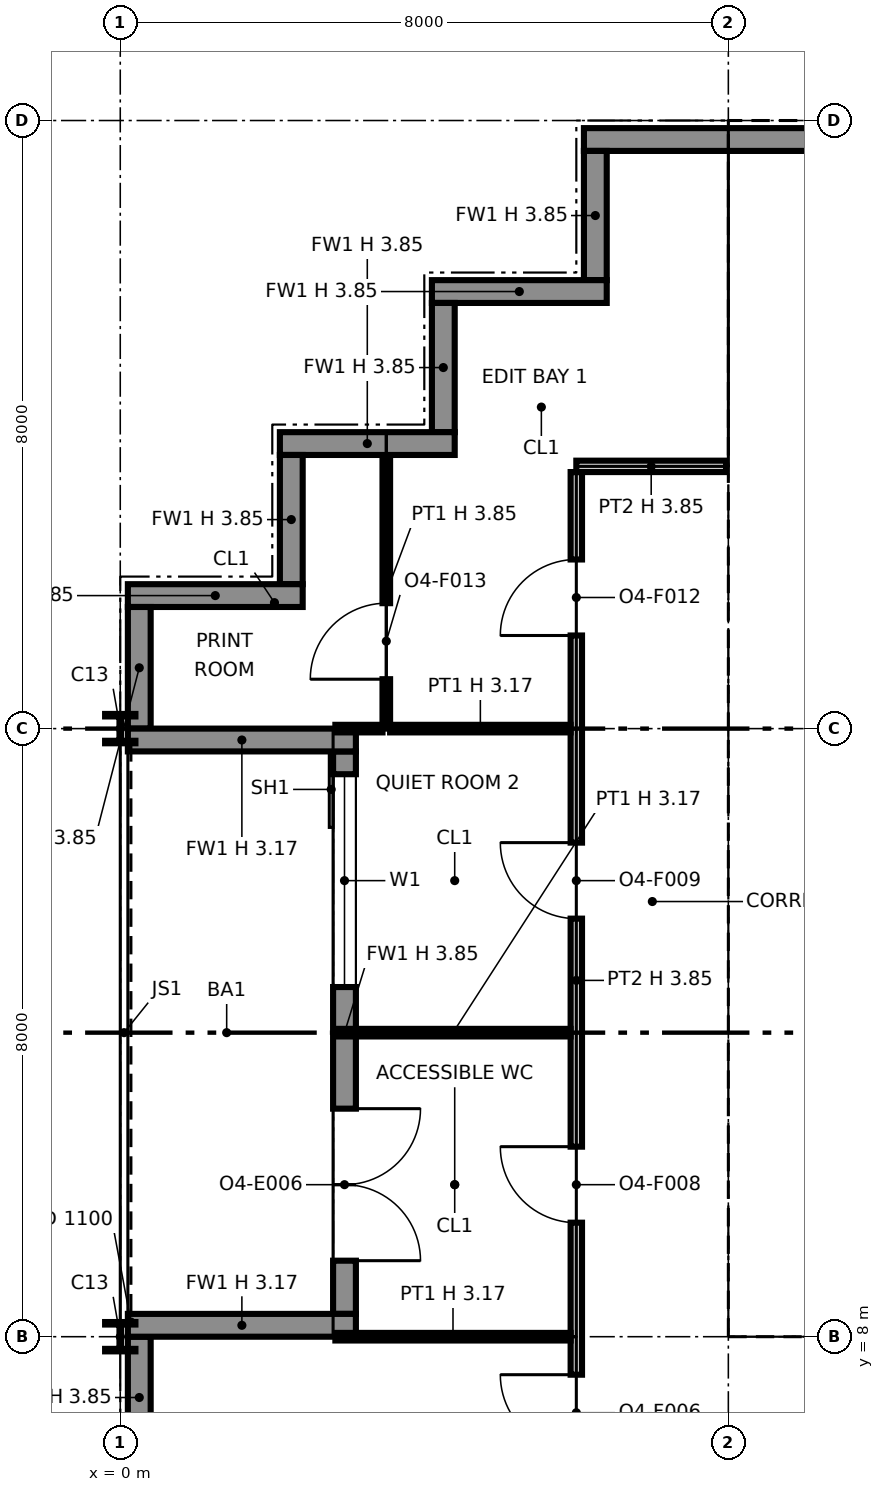
"""IFC4 building model, lengths in metres.
Left out: names, types, materials, properties, quantities, classifications, styles, units other than length and angle.
Written with IfcOpenShell. Run it as: python <this file> out.ifc"""

import sys

from ifc_helpers import new_model, si_unit, direction, frame, frame_2d, origin, origin_2d, place, context, subcontext, project, spatial, polyline, rectangle, i_section, outline, extrude, element, fill, save


model = new_model("IFC4")
c1 = context("Model", 3, precision=1e-05, world=origin(), true_north=direction((0.0, 1.0)))
c2 = subcontext(c1, "Body", "Model", "MODEL_VIEW")
j1 = project(units=[si_unit("LENGTHUNIT", "METRE"), si_unit("PLANEANGLEUNIT", "RADIAN")], contexts=[c1])
p1 = place(None, origin())
s1 = spatial("IfcSite", under=j1, at=p1, CompositionType="ELEMENT")
p2 = place(p1, origin())
s2 = spatial("IfcBuilding", under=s1, at=p2, CompositionType="ELEMENT")
p3 = place(p2, frame((0.0, 0.0, 221.0)))
s3 = spatial("IfcBuildingStorey", under=s2, at=p3, CompositionType="ELEMENT", Elevation=221.0)
for number, where, z_axis, x_axis in (
    (1, (0.0, 8.0, 0.0), (0.0, 0.0, 1.0), (1.0, 0.0, 0.0)),
    (2, (0.0, 16.0, 0.0), (0.0, 0.0, 1.0), (1.0, 0.0, 0.0)),
):
    element("IfcColumn", number, at=place(p3, frame(where, z_axis=z_axis, x_axis=x_axis)), inside=s3, PredefinedType="COLUMN", context=c2, shape_type="SweptSolid", body=[
        extrude(i_section(OverallWidth=0.399, OverallDepth=0.386, WebThickness=0.021, FlangeThickness=0.033, at=origin_2d()), origin(), (0.0, 0.0, 1.0), 3.85),
    ])
for number, where, z_axis, x_axis in (
    (3, (8.0, 8.0, 0.0), (0.0, 0.0, 1.0), (1.0, 0.0, 0.0)),
    (4, (8.0, 16.0, 0.0), (0.0, 0.0, 1.0), (1.0, 0.0, 0.0)),
):
    element("IfcColumn", number, at=place(p3, frame(where, z_axis=z_axis, x_axis=x_axis)), inside=s3, PredefinedType="COLUMN", context=c2, shape_type="SweptSolid", body=[
        extrude(i_section(OverallWidth=0.373, OverallDepth=0.368, WebThickness=0.015, FlangeThickness=0.024, at=origin_2d()), origin(), (0.0, 0.0, 1.0), 3.85),
    ])
p4 = place(p3, frame((8.0, 24.0, 0.0), z_axis=(0.0, 0.0, 1.0), x_axis=(1.0, 0.0, 0.0)))
e5 = element("IfcColumn", 5, at=p4, inside=s3, PredefinedType="COLUMN", context=c2, shape_type="SweptSolid", body=[
    extrude(i_section(OverallWidth=0.406, OverallDepth=0.417, WebThickness=0.03, FlangeThickness=0.048, at=origin_2d()), origin(), (0.0, 0.0, 1.0), 3.85),
])
p5 = place(p3, frame((32.0, 23.75, 0.0), z_axis=(0.0, 0.0, 1.0), x_axis=(-1.0, 0.0, 0.0)))
e6 = element("IfcWall", 6, at=p5, inside=s3, PredefinedType="SOLIDWALL", context=c2, shape_type="SweptSolid", body=[
    extrude(rectangle(XDim=25.9, YDim=0.3, at=frame_2d((12.95, 0.0))), origin(), (0.0, 0.0, 1.0), 3.85),
])
p6 = place(p3, frame((6.25, 23.6, 0.0), z_axis=(0.0, 0.0, 1.0), x_axis=(0.0, -1.0, 0.0)))
e7 = element("IfcWall", 7, at=p6, inside=s3, PredefinedType="SOLIDWALL", context=c2, shape_type="SweptSolid", body=[
    extrude(rectangle(XDim=1.7, YDim=0.3, at=frame_2d((0.85, 0.0))), origin(), (0.0, 0.0, 1.0), 3.85),
])
p7 = place(p3, frame((6.4, 21.75, 0.0), z_axis=(0.0, 0.0, 1.0), x_axis=(-1.0, 0.0, 0.0)))
e8 = element("IfcWall", 8, at=p7, inside=s3, PredefinedType="SOLIDWALL", context=c2, shape_type="SweptSolid", body=[
    extrude(rectangle(XDim=2.3, YDim=0.3, at=frame_2d((1.15, 0.0))), origin(), (0.0, 0.0, 1.0), 3.85),
])
p8 = place(p3, frame((4.25, 21.6, 0.0), z_axis=(0.0, 0.0, 1.0), x_axis=(0.0, -1.0, 0.0)))
e9 = element("IfcWall", 9, at=p8, inside=s3, PredefinedType="SOLIDWALL", context=c2, shape_type="SweptSolid", body=[
    extrude(rectangle(XDim=1.7, YDim=0.3, at=frame_2d((0.85, 0.0))), origin(), (0.0, 0.0, 1.0), 3.85),
])
p9 = place(p3, frame((4.4, 19.75, 0.0), z_axis=(0.0, 0.0, 1.0), x_axis=(-1.0, 0.0, 0.0)))
e10 = element("IfcWall", 10, at=p9, inside=s3, PredefinedType="SOLIDWALL", context=c2, shape_type="SweptSolid", body=[
    extrude(rectangle(XDim=2.3, YDim=0.3, at=frame_2d((1.15, 0.0))), origin(), (0.0, 0.0, 1.0), 3.85),
])
p10 = place(p3, frame((2.25, 19.6, 0.0), z_axis=(0.0, 0.0, 1.0), x_axis=(0.0, -1.0, 0.0)))
e11 = element("IfcWall", 11, at=p10, inside=s3, PredefinedType="SOLIDWALL", context=c2, shape_type="SweptSolid", body=[
    extrude(rectangle(XDim=1.7, YDim=0.3, at=frame_2d((0.85, 0.0))), origin(), (0.0, 0.0, 1.0), 3.85),
])
p11 = place(p3, frame((2.4, 17.75, 0.0), z_axis=(0.0, 0.0, 1.0), x_axis=(-1.0, 0.0, 0.0)))
e12 = element("IfcWall", 12, at=p11, inside=s3, PredefinedType="SOLIDWALL", context=c2, shape_type="SweptSolid", body=[
    extrude(rectangle(XDim=2.3, YDim=0.3, at=frame_2d((1.15, 0.0))), origin(), (0.0, 0.0, 1.0), 3.85),
])
p12 = place(p3, frame((0.25, 17.6, 0.0), z_axis=(0.0, 0.0, 1.0), x_axis=(0.0, -1.0, 0.0)))
e13 = element("IfcWall", 13, at=p12, inside=s3, PredefinedType="SOLIDWALL", context=c2, shape_type="SweptSolid", body=[
    extrude(rectangle(XDim=1.6, YDim=0.3, at=frame_2d((0.8, 0.0))), origin(), (0.0, 0.0, 1.0), 3.85),
])
p13 = place(p3, frame((2.95, 15.7, 0.0), z_axis=(0.0, 0.0, 1.0), x_axis=(0.0, -1.0, 0.0)))
e14 = element("IfcWall", 14, at=p13, inside=s3, PredefinedType="SOLIDWALL", context=c2, shape_type="SweptSolid", body=[
    extrude(rectangle(XDim=7.4, YDim=0.3, at=frame_2d((3.7, 0.0))), origin(), (0.0, 0.0, 1.0), 3.85),
])
p14 = place(p13, frame((0.3, 0.0, 0.9)))
e15 = element("IfcOpeningElement", 15, at=p14, cuts=e14, PredefinedType="OPENING", context=c2, shape_type="SweptSolid", body=[
    extrude(rectangle(XDim=2.8, YDim=2.2, at=frame_2d((1.4, 1.1))), frame((0.0, 0.16, 0.0), z_axis=(0.0, -1.0, 0.0), x_axis=(1.0, 0.0, 0.0)), (0.0, 0.0, 1.0), 0.32),
])
p15 = place(p13, frame((4.7, 0.0, 0.0)))
e16 = element("IfcOpeningElement", 16, at=p15, cuts=e14, PredefinedType="OPENING", context=c2, shape_type="SweptSolid", body=[
    extrude(rectangle(XDim=2.0, YDim=2.4, at=frame_2d((1.0, 1.2))), frame((0.0, 0.16, 0.0), z_axis=(0.0, -1.0, 0.0), x_axis=(1.0, 0.0, 0.0)), (0.0, 0.0, 1.0), 0.32),
])
for number, where, z_axis, x_axis in (
    (17, (0.1, 15.85, 0.0), (0.0, 0.0, 1.0), (1.0, 0.0, 0.0)),
    (18, (0.1, 8.15, 0.0), (0.0, 0.0, 1.0), (1.0, 0.0, 0.0)),
):
    element("IfcWall", number, at=place(p3, frame(where, z_axis=z_axis, x_axis=x_axis)), inside=s3, PredefinedType="SOLIDWALL", context=c2, shape_type="SweptSolid", body=[
        extrude(rectangle(XDim=3.0, YDim=0.3, at=frame_2d((1.5, 0.0))), origin(), (0.0, 0.0, 1.0), 3.171),
    ])
p16 = place(p3, frame((0.25, 8.0, 0.0), z_axis=(0.0, 0.0, 1.0), x_axis=(0.0, -1.0, 0.0)))
e19 = element("IfcWall", 19, at=p16, inside=s3, PredefinedType="SOLIDWALL", context=c2, shape_type="SweptSolid", body=[
    extrude(rectangle(XDim=1.6, YDim=0.3, at=frame_2d((0.8, 0.0))), origin(), (0.0, 0.0, 1.0), 3.85),
])
p17 = place(p3, frame((8.65, 8.75, 0.0), z_axis=(0.0, 0.0, 1.0), x_axis=(1.0, 0.0, 0.0)))
e20 = element("IfcWall", 20, at=p17, inside=s3, PredefinedType="PARTITIONING", context=c2, shape_type="SweptSolid", body=[
    extrude(outline(polyline([(0.0, 0.0), (14.7, 0.0), (14.7, 3.85), (7.438, 3.85), (7.438, 3.308), (7.262, 3.308), (7.261, 3.85), (0.0, 3.85), (0.0, 0.0)])), frame((0.0, 0.1, 0.0), z_axis=(0.0, -1.0, 0.0), x_axis=(1.0, 0.0, 0.0)), (0.0, 0.0, 1.0), 0.2),
])
p18 = place(p17, frame((1.3, 0.0, 0.0)))
e21 = element("IfcOpeningElement", 21, at=p18, cuts=e20, PredefinedType="OPENING", context=c2, shape_type="SweptSolid", body=[
    extrude(rectangle(XDim=1.4, YDim=2.1, at=frame_2d((0.7, 1.05))), frame((0.0, 0.11, 0.0), z_axis=(0.0, -1.0, 0.0), x_axis=(1.0, 0.0, 0.0)), (0.0, 0.0, 1.0), 0.22),
])
p19 = place(p17, frame((4.6, 0.0, 0.0)))
e22 = element("IfcOpeningElement", 22, at=p19, cuts=e20, PredefinedType="OPENING", context=c2, shape_type="SweptSolid", body=[
    extrude(rectangle(XDim=1.4, YDim=2.1, at=frame_2d((0.7, 1.05))), frame((0.0, 0.11, 0.0), z_axis=(0.0, -1.0, 0.0), x_axis=(1.0, 0.0, 0.0)), (0.0, 0.0, 1.0), 0.22),
])
p20 = place(p17, frame((10.4, 0.0, 0.0)))
e23 = element("IfcOpeningElement", 23, at=p20, cuts=e20, PredefinedType="OPENING", context=c2, shape_type="SweptSolid", body=[
    extrude(rectangle(XDim=1.2, YDim=2.1, at=frame_2d((0.6, 1.05))), frame((0.0, 0.11, 0.0), z_axis=(0.0, -1.0, 0.0), x_axis=(1.0, 0.0, 0.0)), (0.0, 0.0, 1.0), 0.22),
])
p21 = place(p3, frame((8.75, 8.85, 0.0), z_axis=(0.0, 0.0, 1.0), x_axis=(0.0, 1.0, 0.0)))
e24 = element("IfcWall", 24, at=p21, inside=s3, PredefinedType="PARTITIONING", context=c2, shape_type="SweptSolid", body=[
    extrude(outline(polyline([(0.0, 0.0), (14.3, 0.0), (14.3, 3.85), (10.225, 3.85), (10.224, 3.44), (10.076, 3.44), (10.075, 3.85), (7.239, 3.85), (7.238, 3.308), (7.062, 3.308), (7.062, 3.85), (0.0, 3.85), (0.0, 0.0)])), frame((0.0, 0.1, 0.0), z_axis=(0.0, -1.0, 0.0), x_axis=(1.0, 0.0, 0.0)), (0.0, 0.0, 1.0), 0.2),
])
p22 = place(p21, frame((8.3, 0.0, 0.0)))
e25 = element("IfcOpeningElement", 25, at=p22, cuts=e24, PredefinedType="OPENING", context=c2, shape_type="SweptSolid", body=[
    extrude(rectangle(XDim=1.8, YDim=2.1, at=frame_2d((0.9, 1.05))), frame((0.0, 0.11, 0.0), z_axis=(0.0, -1.0, 0.0), x_axis=(1.0, 0.0, 0.0)), (0.0, 0.0, 1.0), 0.22),
])
p23 = place(p3, frame((8.65, 23.25, 0.0), z_axis=(0.0, 0.0, 1.0), x_axis=(1.0, 0.0, 0.0)))
e26 = element("IfcWall", 26, at=p23, inside=s3, PredefinedType="PARTITIONING", context=c2, shape_type="SweptSolid", body=[
    extrude(outline(polyline([(0.0, 0.0), (14.7, 0.0), (14.7, 3.85), (7.438, 3.85), (7.438, 3.308), (7.262, 3.308), (7.261, 3.85), (0.0, 3.85), (0.0, 0.0)])), frame((0.0, 0.1, 0.0), z_axis=(0.0, -1.0, 0.0), x_axis=(1.0, 0.0, 0.0)), (0.0, 0.0, 1.0), 0.2),
])
p24 = place(p3, frame((8.85, 16.0, 0.0), z_axis=(0.0, 0.0, 1.0), x_axis=(1.0, 0.0, 0.0)))
e27 = element("IfcWall", 27, at=p24, inside=s3, PredefinedType="PARTITIONING", context=c2, shape_type="SweptSolid", body=[
    extrude(rectangle(XDim=6.953, YDim=0.6, at=frame_2d((3.477, 0.0))), origin(), (0.0, 0.0, 1.0), 3.308),
])
p25 = place(p3, frame((8.85, 19.9, 0.0), z_axis=(0.0, 0.0, 1.0), x_axis=(1.0, 0.0, 0.0)))
e28 = element("IfcWall", 28, at=p25, inside=s3, PredefinedType="PARTITIONING", context=c2, shape_type="SweptSolid", body=[
    extrude(outline(polyline([(0.0, 0.0), (14.3, 0.0), (14.3, 3.85), (7.239, 3.85), (7.238, 3.308), (7.062, 3.308), (7.062, 3.85), (0.0, 3.85), (0.0, 0.0)])), frame((0.0, 0.1, 0.0), z_axis=(0.0, -1.0, 0.0), x_axis=(1.0, 0.0, 0.0)), (0.0, 0.0, 1.0), 0.2),
])
p26 = place(p25, frame((2.125, 0.0, 0.0)))
e29 = element("IfcOpeningElement", 29, at=p26, cuts=e28, PredefinedType="OPENING", context=c2, shape_type="SweptSolid", body=[
    extrude(rectangle(XDim=0.9, YDim=2.1, at=frame_2d((0.45, 1.05))), frame((0.0, 0.11, 0.0), z_axis=(0.0, -1.0, 0.0), x_axis=(1.0, 0.0, 0.0)), (0.0, 0.0, 1.0), 0.22),
])
p27 = place(p25, frame((5.65, 0.0, 0.0)))
e30 = element("IfcOpeningElement", 30, at=p27, cuts=e28, PredefinedType="OPENING", context=c2, shape_type="SweptSolid", body=[
    extrude(rectangle(XDim=1.1, YDim=2.1, at=frame_2d((0.55, 1.05))), frame((0.0, 0.11, 0.0), z_axis=(0.0, -1.0, 0.0), x_axis=(1.0, 0.0, 0.0)), (0.0, 0.0, 1.0), 0.22),
])
p28 = place(p25, frame((7.95, 0.0, 0.0)))
e31 = element("IfcOpeningElement", 31, at=p28, cuts=e28, PredefinedType="OPENING", context=c2, shape_type="SweptSolid", body=[
    extrude(rectangle(XDim=1.1, YDim=2.1, at=frame_2d((0.55, 1.05))), frame((0.0, 0.11, 0.0), z_axis=(0.0, -1.0, 0.0), x_axis=(1.0, 0.0, 0.0)), (0.0, 0.0, 1.0), 0.22),
])
p29 = place(p25, frame((10.25, 0.0, 0.0)))
e32 = element("IfcOpeningElement", 32, at=p29, cuts=e28, PredefinedType="OPENING", context=c2, shape_type="SweptSolid", body=[
    extrude(rectangle(XDim=1.1, YDim=2.1, at=frame_2d((0.55, 1.05))), frame((0.0, 0.11, 0.0), z_axis=(0.0, -1.0, 0.0), x_axis=(1.0, 0.0, 0.0)), (0.0, 0.0, 1.0), 0.22),
])
p30 = place(p25, frame((12.625, 0.0, 0.0)))
e33 = element("IfcOpeningElement", 33, at=p30, cuts=e28, PredefinedType="OPENING", context=c2, shape_type="SweptSolid", body=[
    extrude(rectangle(XDim=1.1, YDim=2.1, at=frame_2d((0.55, 1.05))), frame((0.0, 0.11, 0.0), z_axis=(0.0, -1.0, 0.0), x_axis=(1.0, 0.0, 0.0)), (0.0, 0.0, 1.0), 0.22),
])
p31 = place(p3, frame((6.0, 6.0, 0.0), z_axis=(0.0, 0.0, 1.0), x_axis=(0.0, 1.0, 0.0)))
e34 = element("IfcWall", 34, at=p31, inside=s3, PredefinedType="PARTITIONING", context=c2, shape_type="SweptSolid", body=[
    extrude(outline(polyline([(0.0, 0.0), (13.375, 0.0), (13.375, 3.85), (10.3, 3.85), (10.298, 3.172), (9.702, 3.172), (9.7, 3.85), (6.3, 3.85), (6.298, 3.172), (5.702, 3.172), (5.7, 3.85), (2.3, 3.85), (2.298, 3.172), (1.702, 3.172), (1.7, 3.85), (0.0, 3.85), (0.0, 0.0)])), frame((0.0, 0.075, 0.0), z_axis=(0.0, -1.0, 0.0), x_axis=(1.0, 0.0, 0.0)), (0.0, 0.0, 1.0), 0.15),
])
p32 = place(p31, frame((0.5, 0.0, 0.0)))
e35 = element("IfcOpeningElement", 35, at=p32, cuts=e34, PredefinedType="OPENING", context=c2, shape_type="SweptSolid", body=[
    extrude(rectangle(XDim=1.0, YDim=2.1, at=frame_2d((0.5, 1.05))), frame((0.0, 0.085, 0.0), z_axis=(0.0, -1.0, 0.0), x_axis=(1.0, 0.0, 0.0)), (0.0, 0.0, 1.0), 0.17),
])
p33 = place(p31, frame((3.5, 0.0, 0.0)))
e36 = element("IfcOpeningElement", 36, at=p33, cuts=e34, PredefinedType="OPENING", context=c2, shape_type="SweptSolid", body=[
    extrude(rectangle(XDim=1.0, YDim=2.1, at=frame_2d((0.5, 1.05))), frame((0.0, 0.085, 0.0), z_axis=(0.0, -1.0, 0.0), x_axis=(1.0, 0.0, 0.0)), (0.0, 0.0, 1.0), 0.17),
])
p34 = place(p31, frame((7.5, 0.0, 0.0)))
e37 = element("IfcOpeningElement", 37, at=p34, cuts=e34, PredefinedType="OPENING", context=c2, shape_type="SweptSolid", body=[
    extrude(rectangle(XDim=1.0, YDim=2.1, at=frame_2d((0.5, 1.05))), frame((0.0, 0.085, 0.0), z_axis=(0.0, -1.0, 0.0), x_axis=(1.0, 0.0, 0.0)), (0.0, 0.0, 1.0), 0.17),
])
p35 = place(p31, frame((11.225, 0.0, 0.0)))
e38 = element("IfcOpeningElement", 38, at=p35, cuts=e34, PredefinedType="OPENING", context=c2, shape_type="SweptSolid", body=[
    extrude(rectangle(XDim=1.0, YDim=2.1, at=frame_2d((0.5, 1.05))), frame((0.0, 0.085, 0.0), z_axis=(0.0, -1.0, 0.0), x_axis=(1.0, 0.0, 0.0)), (0.0, 0.0, 1.0), 0.17),
])
for number, where, z_axis, x_axis in (
    (39, (2.83, 8.0, 0.0), (0.0, 0.0, 1.0), (1.0, 0.0, 0.0)),
    (40, (2.83, 12.0, 0.0), (0.0, 0.0, 1.0), (1.0, 0.0, 0.0)),
):
    element("IfcWall", number, at=place(p3, frame(where, z_axis=z_axis, x_axis=x_axis)), inside=s3, PredefinedType="PARTITIONING", context=c2, shape_type="SweptSolid", body=[
        extrude(rectangle(XDim=3.095, YDim=0.1, at=frame_2d((1.547, 0.0))), origin(), (0.0, 0.0, 1.0), 3.172),
    ])
p36 = place(p3, frame((2.83, 16.0, 0.0), z_axis=(0.0, 0.0, 1.0), x_axis=(1.0, 0.0, 0.0)))
e41 = element("IfcWall", 41, at=p36, inside=s3, PredefinedType="PARTITIONING", context=c2, shape_type="SweptSolid", body=[
    extrude(rectangle(XDim=0.62, YDim=0.1, at=frame_2d((0.31, 0.0))), origin(), (0.0, 0.0, 1.0), 3.172),
])
p37 = place(p3, frame((3.55, 16.0, 0.0), z_axis=(0.0, 0.0, 1.0), x_axis=(1.0, 0.0, 0.0)))
e42 = element("IfcWall", 42, at=p37, inside=s3, PredefinedType="PARTITIONING", context=c2, shape_type="SweptSolid", body=[
    extrude(rectangle(XDim=2.375, YDim=0.1, at=frame_2d((1.188, 0.0))), origin(), (0.0, 0.0, 1.0), 3.172),
])
p38 = place(p3, frame((3.5, 16.0, 0.0), z_axis=(0.0, 0.0, 1.0), x_axis=(0.0, 1.0, 0.0)))
e43 = element("IfcWall", 43, at=p38, inside=s3, PredefinedType="PARTITIONING", context=c2, shape_type="SweptSolid", body=[
    extrude(rectangle(XDim=3.57, YDim=0.1, at=frame_2d((1.785, 0.0))), origin(), (0.0, 0.0, 1.0), 3.85),
])
p39 = place(p38, frame((0.65, 0.0, 0.0)))
e44 = element("IfcOpeningElement", 44, at=p39, cuts=e43, PredefinedType="OPENING", context=c2, shape_type="SweptSolid", body=[
    extrude(rectangle(XDim=1.0, YDim=2.1, at=frame_2d((0.5, 1.05))), frame((0.0, 0.06, 0.0), z_axis=(0.0, -1.0, 0.0), x_axis=(1.0, 0.0, 0.0)), (0.0, 0.0, 1.0), 0.12),
])
p40 = place(p3, frame((6.0, 19.45, 0.0), z_axis=(0.0, 0.0, 1.0), x_axis=(1.0, 0.0, 0.0)))
e45 = element("IfcWall", 45, at=p40, inside=s3, PredefinedType="PARTITIONING", context=c2, shape_type="SweptSolid", body=[
    extrude(rectangle(XDim=1.97, YDim=0.15, at=frame_2d((0.985, 0.0))), origin(), (0.0, 0.0, 1.0), 3.85),
])
p41 = place(p14, origin())
e46 = element("IfcWindow", 46, at=p41, inside=s3, PartitioningType="SINGLE_PANEL", PredefinedType="WINDOW", context=c2, shape_type="SweptSolid", body=[
    extrude(rectangle(XDim=2.8, YDim=2.2, at=frame_2d((1.4, 1.1))), frame((0.0, 0.03, 0.0), z_axis=(0.0, -1.0, 0.0), x_axis=(1.0, 0.0, 0.0)), (0.0, 0.0, 1.0), 0.06),
])
fill(e15, e46)
p42 = place(p15, origin())
e47 = element("IfcDoor", 47, at=p42, inside=s3, OperationType="DOUBLE_DOOR_SINGLE_SWING", PredefinedType="DOOR", context=c2, shape_type="SweptSolid", body=[
    extrude(rectangle(XDim=2.0, YDim=2.4, at=frame_2d((1.0, 1.2))), frame((0.0, 0.025, 0.0), z_axis=(0.0, -1.0, 0.0), x_axis=(1.0, 0.0, 0.0)), (0.0, 0.0, 1.0), 0.05),
])
fill(e16, e47)
p43 = place(p22, origin())
e48 = element("IfcDoor", 48, at=p43, inside=s3, OperationType="DOUBLE_DOOR_SINGLE_SWING", PredefinedType="NOTDEFINED", context=c2, shape_type="SweptSolid", body=[
    extrude(rectangle(XDim=1.8, YDim=2.1, at=frame_2d((0.9, 1.05))), frame((0.0, 0.025, 0.0), z_axis=(0.0, -1.0, 0.0), x_axis=(1.0, 0.0, 0.0)), (0.0, 0.0, 1.0), 0.05),
])
fill(e25, e48)
p44 = place(p32, origin())
e49 = element("IfcDoor", 49, at=p44, inside=s3, OperationType="SINGLE_SWING_RIGHT", PredefinedType="DOOR", context=c2, shape_type="SweptSolid", body=[
    extrude(rectangle(XDim=1.0, YDim=2.1, at=frame_2d((0.5, 1.05))), frame((0.0, 0.025, 0.0), z_axis=(0.0, -1.0, 0.0), x_axis=(1.0, 0.0, 0.0)), (0.0, 0.0, 1.0), 0.05),
])
fill(e35, e49)
p45 = place(p33, origin())
e50 = element("IfcDoor", 50, at=p45, inside=s3, OperationType="SINGLE_SWING_RIGHT", PredefinedType="DOOR", context=c2, shape_type="SweptSolid", body=[
    extrude(rectangle(XDim=1.0, YDim=2.1, at=frame_2d((0.5, 1.05))), frame((0.0, 0.025, 0.0), z_axis=(0.0, -1.0, 0.0), x_axis=(1.0, 0.0, 0.0)), (0.0, 0.0, 1.0), 0.05),
])
fill(e36, e50)
p46 = place(p34, origin())
e51 = element("IfcDoor", 51, at=p46, inside=s3, OperationType="SINGLE_SWING_RIGHT", PredefinedType="DOOR", context=c2, shape_type="SweptSolid", body=[
    extrude(rectangle(XDim=1.0, YDim=2.1, at=frame_2d((0.5, 1.05))), frame((0.0, 0.025, 0.0), z_axis=(0.0, -1.0, 0.0), x_axis=(1.0, 0.0, 0.0)), (0.0, 0.0, 1.0), 0.05),
])
fill(e37, e51)
p47 = place(p35, origin())
e52 = element("IfcDoor", 52, at=p47, inside=s3, OperationType="SINGLE_SWING_LEFT", PredefinedType="DOOR", context=c2, shape_type="SweptSolid", body=[
    extrude(rectangle(XDim=1.0, YDim=2.1, at=frame_2d((0.5, 1.05))), frame((0.0, 0.025, 0.0), z_axis=(0.0, -1.0, 0.0), x_axis=(1.0, 0.0, 0.0)), (0.0, 0.0, 1.0), 0.05),
])
fill(e38, e52)
p48 = place(p39, origin())
e53 = element("IfcDoor", 53, at=p48, inside=s3, OperationType="SINGLE_SWING_LEFT", PredefinedType="DOOR", context=c2, shape_type="SweptSolid", body=[
    extrude(rectangle(XDim=1.0, YDim=2.1, at=frame_2d((0.5, 1.05))), frame((0.0, 0.025, 0.0), z_axis=(0.0, -1.0, 0.0), x_axis=(1.0, 0.0, 0.0)), (0.0, 0.0, 1.0), 0.05),
])
fill(e44, e53)
save(model, sys.argv[1])
